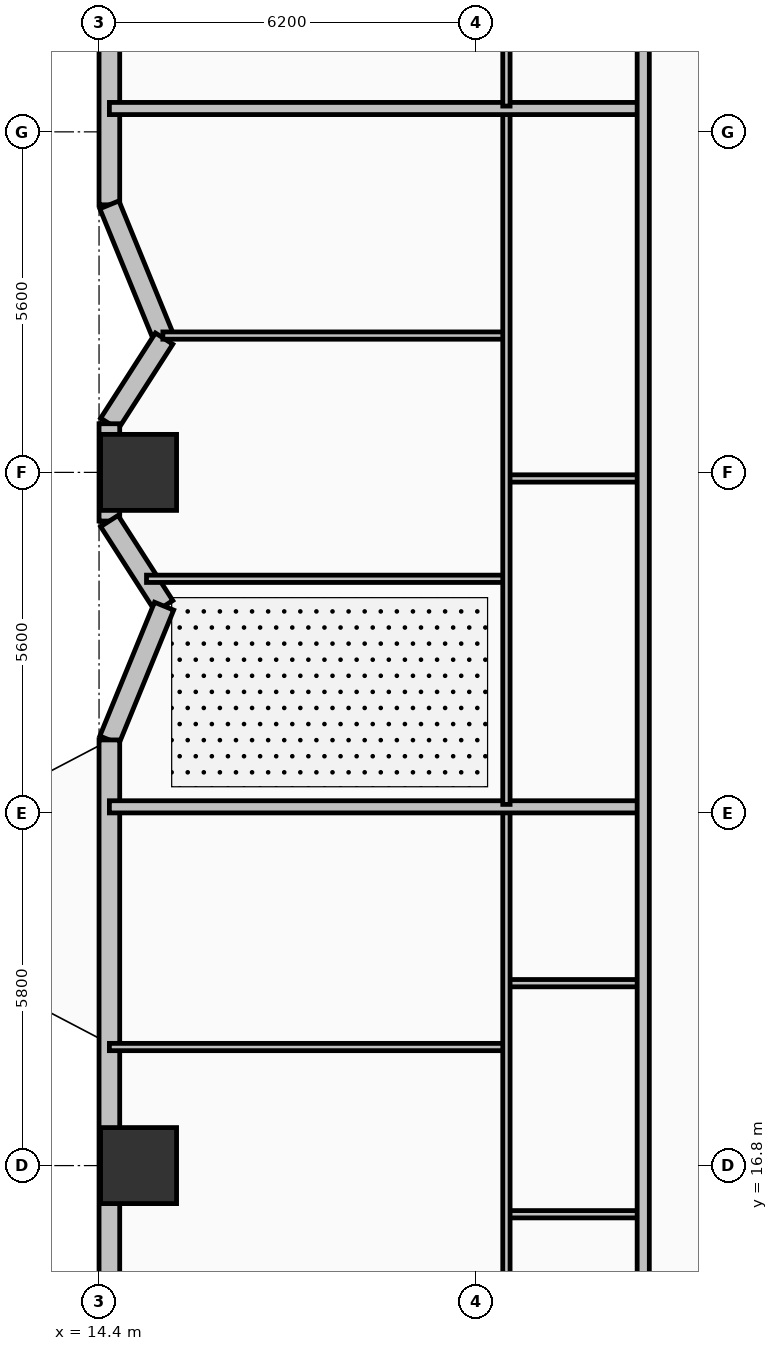
"""IFC4 building model, lengths in metres.
Left out: names, types, materials, properties, quantities, classifications, styles, units other than length and angle.
Written with IfcOpenShell. Run it as: python <this file> out.ifc"""

import sys

from ifc_helpers import new_model, si_unit, direction, frame, frame_2d, origin, origin_2d, place, context, subcontext, project, spatial, rectangle, extrude, element, fill, save


model = new_model("IFC4")
c1 = context("Model", 3, precision=1e-05, world=origin(), true_north=direction((0.0, 1.0)))
c2 = subcontext(c1, "Body", "Model", "MODEL_VIEW")
j1 = project(units=[si_unit("LENGTHUNIT", "METRE"), si_unit("PLANEANGLEUNIT", "RADIAN")], contexts=[c1])
p1 = place(None, origin())
s1 = spatial("IfcSite", under=j1, at=p1, CompositionType="ELEMENT")
p2 = place(p1, origin())
s2 = spatial("IfcBuilding", under=s1, at=p2, CompositionType="ELEMENT")
p3 = place(p2, frame((0.0, 0.0, 36.2)))
s3 = spatial("IfcBuildingStorey", under=s2, at=p3, CompositionType="ELEMENT", Elevation=36.2)
for number, where, z_axis, x_axis in (
    (1, (15.05, 16.8, 0.0), (0.0, 0.0, 1.0), (1.0, 0.0, 0.0)),
    (2, (15.05, 28.2, 0.0), (0.0, 0.0, 1.0), (1.0, 0.0, 0.0)),
):
    element("IfcColumn", number, at=place(p3, frame(where, z_axis=z_axis, x_axis=x_axis)), inside=s3, PredefinedType="COLUMN", context=c2, shape_type="SweptSolid", body=[
        extrude(rectangle(XDim=1.25, YDim=1.25, at=origin_2d()), origin(), (0.0, 0.0, 1.0), 3.7),
    ])
p4 = place(p3, frame((14.57, 47.4, 0.0), z_axis=(0.0, 0.0, 1.0), x_axis=(0.0, -1.0, 0.0)))
e3 = element("IfcWall", 3, at=p4, inside=s3, PredefinedType="SOLIDWALL", context=c2, shape_type="SweptSolid", body=[
    extrude(rectangle(XDim=14.8, YDim=0.34, at=frame_2d((7.4, 0.0))), origin(), (0.0, 0.0, 1.0), 2.7),
])
p5 = place(p4, frame((2.84, 0.0, 0.69)))
e4 = element("IfcOpeningElement", 4, at=p5, cuts=e3, PredefinedType="OPENING", context=c2, shape_type="SweptSolid", body=[
    extrude(rectangle(XDim=1.4, YDim=1.85, at=frame_2d((0.7, 0.925))), frame((0.0, 0.18, 0.0), z_axis=(0.0, -1.0, 0.0), x_axis=(1.0, 0.0, 0.0)), (0.0, 0.0, 1.0), 0.36),
])
p6 = place(p4, frame((5.72, 0.0, 0.69)))
e5 = element("IfcOpeningElement", 5, at=p6, cuts=e3, PredefinedType="OPENING", context=c2, shape_type="SweptSolid", body=[
    extrude(rectangle(XDim=1.4, YDim=1.85, at=frame_2d((0.7, 0.925))), frame((0.0, 0.18, 0.0), z_axis=(0.0, -1.0, 0.0), x_axis=(1.0, 0.0, 0.0)), (0.0, 0.0, 1.0), 0.36),
])
p7 = place(p4, frame((11.413, 0.0, 0.73)))
e6 = element("IfcOpeningElement", 6, at=p7, cuts=e3, PredefinedType="OPENING", context=c2, shape_type="SweptSolid", body=[
    extrude(rectangle(XDim=1.4, YDim=1.85, at=frame_2d((0.7, 0.925))), frame((0.0, 0.18, 0.0), z_axis=(0.0, -1.0, 0.0), x_axis=(1.0, 0.0, 0.0)), (0.0, 0.0, 1.0), 0.36),
])
p8 = place(p3, frame((14.57, 32.6, 0.0), z_axis=(0.0, 0.0, 1.0), x_axis=(0.378568858991, -0.925573130013, 0.0)))
e7 = element("IfcWall", 7, at=p8, inside=s3, PredefinedType="SOLIDWALL", context=c2, shape_type="SweptSolid", body=[
    extrude(rectangle(XDim=2.377, YDim=0.34, at=frame_2d((1.188, 0.0))), origin(), (0.0, 0.0, 1.0), 2.7),
])
p9 = place(p8, frame((0.638, 0.0, 0.89)))
e8 = element("IfcOpeningElement", 8, at=p9, cuts=e7, PredefinedType="OPENING", context=c2, shape_type="SweptSolid", body=[
    extrude(rectangle(XDim=1.1, YDim=1.65, at=frame_2d((0.55, 0.825))), frame((0.0, 0.18, 0.0), z_axis=(0.0, -1.0, 0.0), x_axis=(1.0, 0.0, 0.0)), (0.0, 0.0, 1.0), 0.36),
])
p10 = place(p3, frame((15.47, 30.4, 0.0), z_axis=(0.0, 0.0, 1.0), x_axis=(-0.540742762169, -0.841188008214, 0.0)))
e9 = element("IfcWall", 9, at=p10, inside=s3, PredefinedType="SOLIDWALL", context=c2, shape_type="SweptSolid", body=[
    extrude(rectangle(XDim=1.664, YDim=0.34, at=frame_2d((0.832, 0.0))), origin(), (0.0, 0.0, 1.0), 2.7),
])
p11 = place(p10, frame((0.16, 0.0, 0.89)))
e10 = element("IfcOpeningElement", 10, at=p11, cuts=e9, PredefinedType="OPENING", context=c2, shape_type="SweptSolid", body=[
    extrude(rectangle(XDim=1.1, YDim=1.65, at=frame_2d((0.55, 0.825))), frame((0.0, 0.18, 0.0), z_axis=(0.0, -1.0, 0.0), x_axis=(1.0, 0.0, 0.0)), (0.0, 0.0, 1.0), 0.36),
])
p12 = place(p3, frame((14.57, 29.0, 0.0), z_axis=(0.0, 0.0, 1.0), x_axis=(0.0, -1.0, 0.0)))
e11 = element("IfcWall", 11, at=p12, inside=s3, PredefinedType="SOLIDWALL", context=c2, shape_type="SweptSolid", body=[
    extrude(rectangle(XDim=1.6, YDim=0.34, at=frame_2d((0.8, 0.0))), origin(), (0.0, 0.0, 1.0), 2.7),
])
p13 = place(p3, frame((14.57, 27.4, 0.0), z_axis=(0.0, 0.0, 1.0), x_axis=(0.540742762169, -0.841188008214, 0.0)))
e12 = element("IfcWall", 12, at=p13, inside=s3, PredefinedType="SOLIDWALL", context=c2, shape_type="SweptSolid", body=[
    extrude(rectangle(XDim=1.664, YDim=0.34, at=frame_2d((0.832, 0.0))), origin(), (0.0, 0.0, 1.0), 2.7),
])
p14 = place(p3, frame((15.47, 26.0, 0.0), z_axis=(0.0, 0.0, 1.0), x_axis=(-0.378604849088, -0.925558408879, 0.0)))
e13 = element("IfcWall", 13, at=p14, inside=s3, PredefinedType="SOLIDWALL", context=c2, shape_type="SweptSolid", body=[
    extrude(rectangle(XDim=2.377, YDim=0.34, at=frame_2d((1.188, 0.0))), origin(), (0.0, 0.0, 1.0), 2.7),
])
p15 = place(p14, frame((0.638, 0.0, 0.89)))
e14 = element("IfcOpeningElement", 14, at=p15, cuts=e13, PredefinedType="OPENING", context=c2, shape_type="SweptSolid", body=[
    extrude(rectangle(XDim=1.1, YDim=1.65, at=frame_2d((0.55, 0.825))), frame((0.0, 0.18, 0.0), z_axis=(0.0, -1.0, 0.0), x_axis=(1.0, 0.0, 0.0)), (0.0, 0.0, 1.0), 0.36),
])
p16 = place(p3, frame((14.57, 23.8, 0.0), z_axis=(0.0, 0.0, 1.0), x_axis=(0.0, -1.0, 0.0)))
e15 = element("IfcWall", 15, at=p16, inside=s3, PredefinedType="SOLIDWALL", context=c2, shape_type="SweptSolid", body=[
    extrude(rectangle(XDim=14.8, YDim=0.34, at=frame_2d((7.4, 0.0))), origin(), (0.0, 0.0, 1.0), 2.7),
])
p17 = place(p16, frame((1.7, 0.0, 0.0)))
e16 = element("IfcOpeningElement", 16, at=p17, cuts=e15, PredefinedType="OPENING", context=c2, shape_type="SweptSolid", body=[
    extrude(rectangle(XDim=1.6, YDim=2.1, at=frame_2d((0.8, 1.05))), frame((0.0, 0.18, 0.0), z_axis=(0.0, -1.0, 0.0), x_axis=(1.0, 0.0, 0.0)), (0.0, 0.0, 1.0), 0.36),
])
p18 = place(p16, frame((7.68, 0.0, 0.89)))
e17 = element("IfcOpeningElement", 17, at=p18, cuts=e15, PredefinedType="OPENING", context=c2, shape_type="SweptSolid", body=[
    extrude(rectangle(XDim=1.1, YDim=1.65, at=frame_2d((0.55, 0.825))), frame((0.0, 0.18, 0.0), z_axis=(0.0, -1.0, 0.0), x_axis=(1.0, 0.0, 0.0)), (0.0, 0.0, 1.0), 0.36),
])
p19 = place(p16, frame((9.9, 0.0, 0.93)))
e18 = element("IfcOpeningElement", 18, at=p19, cuts=e15, PredefinedType="OPENING", context=c2, shape_type="SweptSolid", body=[
    extrude(rectangle(XDim=1.1, YDim=1.65, at=frame_2d((0.55, 0.825))), frame((0.0, 0.18, 0.0), z_axis=(0.0, -1.0, 0.0), x_axis=(1.0, 0.0, 0.0)), (0.0, 0.0, 1.0), 0.36),
])
p20 = place(p3, frame((21.1, 16.0, 0.0), z_axis=(0.0, 0.0, 1.0), x_axis=(1.0, 0.0, 0.0)))
e19 = element("IfcWall", 19, at=p20, inside=s3, PredefinedType="PARTITIONING", context=c2, shape_type="SweptSolid", body=[
    extrude(rectangle(XDim=2.25, YDim=0.12, at=frame_2d((1.125, 0.0))), origin(), (0.0, 0.0, 1.0), 2.53),
])
p21 = place(p20, frame((0.6, 0.0, 0.0)))
e20 = element("IfcOpeningElement", 20, at=p21, cuts=e19, PredefinedType="OPENING", context=c2, shape_type="SweptSolid", body=[
    extrude(rectangle(XDim=0.85, YDim=2.1, at=frame_2d((0.425, 1.05))), frame((0.0, 0.07, 0.0), z_axis=(0.0, -1.0, 0.0), x_axis=(1.0, 0.0, 0.0)), (0.0, 0.0, 1.0), 0.14),
])
p22 = place(p3, frame((21.1, 19.8, 0.0), z_axis=(0.0, 0.0, 1.0), x_axis=(1.0, 0.0, 0.0)))
e21 = element("IfcWall", 21, at=p22, inside=s3, PredefinedType="PARTITIONING", context=c2, shape_type="SweptSolid", body=[
    extrude(rectangle(XDim=2.25, YDim=0.12, at=frame_2d((1.125, 0.0))), origin(), (0.0, 0.0, 1.0), 2.53),
])
p23 = place(p3, frame((14.57, 18.75, 0.0), z_axis=(0.0, 0.0, 1.0), x_axis=(1.0, 0.0, 0.0)))
e22 = element("IfcWall", 22, at=p23, inside=s3, PredefinedType="PARTITIONING", context=c2, shape_type="SweptSolid", body=[
    extrude(rectangle(XDim=6.53, YDim=0.12, at=frame_2d((3.265, 0.0))), origin(), (0.0, 0.0, 1.0), 2.53),
])
p24 = place(p23, frame((5.18, 0.0, 0.0)))
e23 = element("IfcOpeningElement", 23, at=p24, cuts=e22, PredefinedType="OPENING", context=c2, shape_type="SweptSolid", body=[
    extrude(rectangle(XDim=0.9, YDim=2.1, at=frame_2d((0.45, 1.05))), frame((0.0, 0.07, 0.0), z_axis=(0.0, -1.0, 0.0), x_axis=(1.0, 0.0, 0.0)), (0.0, 0.0, 1.0), 0.14),
])
p25 = place(p3, frame((21.1, 10.64, 0.0), z_axis=(0.0, 0.0, 1.0), x_axis=(0.0, 1.0, 0.0)))
e24 = element("IfcWall", 24, at=p25, inside=s3, PredefinedType="PARTITIONING", context=c2, shape_type="SweptSolid", body=[
    extrude(rectangle(XDim=12.02, YDim=0.12, at=frame_2d((6.01, 0.0))), origin(), (0.0, 0.0, 1.0), 2.53),
])
p26 = place(p25, frame((0.41, 0.0, 0.0)))
e25 = element("IfcOpeningElement", 25, at=p26, cuts=e24, PredefinedType="OPENING", context=c2, shape_type="SweptSolid", body=[
    extrude(rectangle(XDim=0.9, YDim=2.1, at=frame_2d((0.45, 1.05))), frame((0.0, 0.07, 0.0), z_axis=(0.0, -1.0, 0.0), x_axis=(1.0, 0.0, 0.0)), (0.0, 0.0, 1.0), 0.14),
])
p27 = place(p25, frame((10.185, 0.0, 0.0)))
e26 = element("IfcOpeningElement", 26, at=p27, cuts=e24, PredefinedType="OPENING", context=c2, shape_type="SweptSolid", body=[
    extrude(rectangle(XDim=0.82, YDim=2.08, at=frame_2d((0.41, 1.04))), frame((0.0, 0.07, 0.0), z_axis=(0.0, -1.0, 0.0), x_axis=(1.0, 0.0, 0.0)), (0.0, 0.0, 1.0), 0.14),
])
p28 = place(p3, frame((14.57, 22.7, 0.0), z_axis=(0.0, 0.0, 1.0), x_axis=(1.0, 0.0, 0.0)))
e27 = element("IfcWall", 27, at=p28, inside=s3, PredefinedType="PARTITIONING", context=c2, shape_type="SweptSolid", body=[
    extrude(rectangle(XDim=8.78, YDim=0.2, at=frame_2d((4.39, 0.0))), origin(), (0.0, 0.0, 1.0), 2.53),
])
p29 = place(p3, frame((21.1, 28.1, 0.0), z_axis=(0.0, 0.0, 1.0), x_axis=(1.0, 0.0, 0.0)))
e28 = element("IfcWall", 28, at=p29, inside=s3, PredefinedType="PARTITIONING", context=c2, shape_type="SweptSolid", body=[
    extrude(rectangle(XDim=2.25, YDim=0.12, at=frame_2d((1.125, 0.0))), origin(), (0.0, 0.0, 1.0), 2.53),
])
p30 = place(p29, frame((0.6, 0.0, 0.0)))
e29 = element("IfcOpeningElement", 29, at=p30, cuts=e28, PredefinedType="OPENING", context=c2, shape_type="SweptSolid", body=[
    extrude(rectangle(XDim=0.85, YDim=2.1, at=frame_2d((0.425, 1.05))), frame((0.0, 0.07, 0.0), z_axis=(0.0, -1.0, 0.0), x_axis=(1.0, 0.0, 0.0)), (0.0, 0.0, 1.0), 0.14),
])
p31 = place(p3, frame((15.181, 26.45, 0.0), z_axis=(0.0, 0.0, 1.0), x_axis=(1.0, 0.0, 0.0)))
e30 = element("IfcWall", 30, at=p31, inside=s3, PredefinedType="PARTITIONING", context=c2, shape_type="SweptSolid", body=[
    extrude(rectangle(XDim=5.919, YDim=0.12, at=frame_2d((2.96, 0.0))), origin(), (0.0, 0.0, 1.0), 2.53),
])
p32 = place(p31, frame((4.569, 0.0, 0.0)))
e31 = element("IfcOpeningElement", 31, at=p32, cuts=e30, PredefinedType="OPENING", context=c2, shape_type="SweptSolid", body=[
    extrude(rectangle(XDim=0.9, YDim=2.1, at=frame_2d((0.45, 1.05))), frame((0.0, 0.07, 0.0), z_axis=(0.0, -1.0, 0.0), x_axis=(1.0, 0.0, 0.0)), (0.0, 0.0, 1.0), 0.14),
])
p33 = place(p3, frame((15.449, 30.45, 0.0), z_axis=(0.0, 0.0, 1.0), x_axis=(1.0, 0.0, 0.0)))
e32 = element("IfcWall", 32, at=p33, inside=s3, PredefinedType="PARTITIONING", context=c2, shape_type="SweptSolid", body=[
    extrude(rectangle(XDim=5.651, YDim=0.12, at=frame_2d((2.825, 0.0))), origin(), (0.0, 0.0, 1.0), 2.53),
])
p34 = place(p33, frame((4.301, 0.0, 0.0)))
e33 = element("IfcOpeningElement", 33, at=p34, cuts=e32, PredefinedType="OPENING", context=c2, shape_type="SweptSolid", body=[
    extrude(rectangle(XDim=0.9, YDim=2.1, at=frame_2d((0.45, 1.05))), frame((0.0, 0.07, 0.0), z_axis=(0.0, -1.0, 0.0), x_axis=(1.0, 0.0, 0.0)), (0.0, 0.0, 1.0), 0.14),
])
p35 = place(p3, frame((21.1, 22.74, 0.0), z_axis=(0.0, 0.0, 1.0), x_axis=(0.0, 1.0, 0.0)))
e34 = element("IfcWall", 34, at=p35, inside=s3, PredefinedType="PARTITIONING", context=c2, shape_type="SweptSolid", body=[
    extrude(rectangle(XDim=11.404, YDim=0.12, at=frame_2d((5.702, 0.0))), origin(), (0.0, 0.0, 1.0), 2.53),
])
p36 = place(p35, frame((0.41, 0.0, 0.0)))
e35 = element("IfcOpeningElement", 35, at=p36, cuts=e34, PredefinedType="OPENING", context=c2, shape_type="SweptSolid", body=[
    extrude(rectangle(XDim=0.9, YDim=2.1, at=frame_2d((0.45, 1.05))), frame((0.0, 0.07, 0.0), z_axis=(0.0, -1.0, 0.0), x_axis=(1.0, 0.0, 0.0)), (0.0, 0.0, 1.0), 0.14),
])
p37 = place(p3, frame((14.57, 34.184, 0.0), z_axis=(0.0, 0.0, 1.0), x_axis=(1.0, 0.0, 0.0)))
e36 = element("IfcWall", 36, at=p37, inside=s3, PredefinedType="PARTITIONING", context=c2, shape_type="SweptSolid", body=[
    extrude(rectangle(XDim=8.78, YDim=0.2, at=frame_2d((4.39, 0.0))), origin(), (0.0, 0.0, 1.0), 2.53),
])
p38 = place(p3, frame((21.1, 34.224, 0.0), z_axis=(0.0, 0.0, 1.0), x_axis=(0.0, 1.0, 0.0)))
e37 = element("IfcWall", 37, at=p38, inside=s3, PredefinedType="PARTITIONING", context=c2, shape_type="SweptSolid", body=[
    extrude(rectangle(XDim=11.536, YDim=0.12, at=frame_2d((5.768, 0.0))), origin(), (0.0, 0.0, 1.0), 2.53),
])
p39 = place(p38, frame((0.41, 0.0, 0.0)))
e38 = element("IfcOpeningElement", 38, at=p39, cuts=e37, PredefinedType="OPENING", context=c2, shape_type="SweptSolid", body=[
    extrude(rectangle(XDim=0.9, YDim=2.1, at=frame_2d((0.45, 1.05))), frame((0.0, 0.07, 0.0), z_axis=(0.0, -1.0, 0.0), x_axis=(1.0, 0.0, 0.0)), (0.0, 0.0, 1.0), 0.14),
])
p40 = place(p3, frame((23.35, 10.6, 0.0), z_axis=(0.0, 0.0, 1.0), x_axis=(0.0, 1.0, 0.0)))
e39 = element("IfcWall", 39, at=p40, inside=s3, PredefinedType="PARTITIONING", context=c2, shape_type="SweptSolid", body=[
    extrude(rectangle(XDim=35.2, YDim=0.2, at=frame_2d((17.6, 0.0))), origin(), (0.0, 0.0, 1.0), 2.53),
])
p41 = place(p40, frame((2.65, 0.0, 0.0)))
e40 = element("IfcOpeningElement", 40, at=p41, cuts=e39, PredefinedType="OPENING", context=c2, shape_type="SweptSolid", body=[
    extrude(rectangle(XDim=1.0, YDim=2.15, at=frame_2d((0.5, 1.075))), frame((0.0, 0.11, 0.0), z_axis=(0.0, -1.0, 0.0), x_axis=(1.0, 0.0, 0.0)), (0.0, 0.0, 1.0), 0.22),
])
p42 = place(p40, frame((12.65, 0.0, 0.0)))
e41 = element("IfcOpeningElement", 41, at=p42, cuts=e39, PredefinedType="OPENING", context=c2, shape_type="SweptSolid", body=[
    extrude(rectangle(XDim=1.0, YDim=2.15, at=frame_2d((0.5, 1.075))), frame((0.0, 0.11, 0.0), z_axis=(0.0, -1.0, 0.0), x_axis=(1.0, 0.0, 0.0)), (0.0, 0.0, 1.0), 0.22),
])
p43 = place(p40, frame((24.134, 0.0, 0.0)))
e42 = element("IfcOpeningElement", 42, at=p43, cuts=e39, PredefinedType="OPENING", context=c2, shape_type="SweptSolid", body=[
    extrude(rectangle(XDim=1.0, YDim=2.15, at=frame_2d((0.5, 1.075))), frame((0.0, 0.11, 0.0), z_axis=(0.0, -1.0, 0.0), x_axis=(1.0, 0.0, 0.0)), (0.0, 0.0, 1.0), 0.22),
])
p44 = place(p7, origin())
e43 = element("IfcWindow", 43, at=p44, inside=s3, PartitioningType="SINGLE_PANEL", PredefinedType="WINDOW", context=c2, shape_type="SweptSolid", body=[
    extrude(rectangle(XDim=1.4, YDim=1.85, at=frame_2d((0.7, 0.925))), frame((0.0, 0.03, 0.0), z_axis=(0.0, -1.0, 0.0), x_axis=(1.0, 0.0, 0.0)), (0.0, 0.0, 1.0), 0.06),
])
fill(e6, e43)
p45 = place(p9, origin())
e44 = element("IfcWindow", 44, at=p45, inside=s3, PartitioningType="SINGLE_PANEL", PredefinedType="WINDOW", context=c2, shape_type="SweptSolid", body=[
    extrude(rectangle(XDim=1.1, YDim=1.65, at=frame_2d((0.55, 0.825))), frame((0.0, 0.03, 0.0), z_axis=(0.0, -1.0, 0.0), x_axis=(1.0, 0.0, 0.0)), (0.0, 0.0, 1.0), 0.06),
])
fill(e8, e44)
p46 = place(p11, origin())
e45 = element("IfcWindow", 45, at=p46, inside=s3, PartitioningType="SINGLE_PANEL", PredefinedType="WINDOW", context=c2, shape_type="SweptSolid", body=[
    extrude(rectangle(XDim=1.1, YDim=1.65, at=frame_2d((0.55, 0.825))), frame((0.0, 0.03, 0.0), z_axis=(0.0, -1.0, 0.0), x_axis=(1.0, 0.0, 0.0)), (0.0, 0.0, 1.0), 0.06),
])
fill(e10, e45)
p47 = place(p15, origin())
e46 = element("IfcWindow", 46, at=p47, inside=s3, PartitioningType="SINGLE_PANEL", PredefinedType="WINDOW", context=c2, shape_type="SweptSolid", body=[
    extrude(rectangle(XDim=1.1, YDim=1.65, at=frame_2d((0.55, 0.825))), frame((0.0, 0.03, 0.0), z_axis=(0.0, -1.0, 0.0), x_axis=(1.0, 0.0, 0.0)), (0.0, 0.0, 1.0), 0.06),
])
fill(e14, e46)
p48 = place(p17, origin())
e47 = element("IfcDoor", 47, at=p48, inside=s3, OperationType="DOUBLE_DOOR_SINGLE_SWING", PredefinedType="DOOR", context=c2, shape_type="SweptSolid", body=[
    extrude(rectangle(XDim=1.6, YDim=2.1, at=frame_2d((0.8, 1.05))), frame((0.0, 0.025, 0.0), z_axis=(0.0, -1.0, 0.0), x_axis=(1.0, 0.0, 0.0)), (0.0, 0.0, 1.0), 0.05),
])
fill(e16, e47)
p49 = place(p18, origin())
e48 = element("IfcWindow", 48, at=p49, inside=s3, PartitioningType="SINGLE_PANEL", PredefinedType="WINDOW", context=c2, shape_type="SweptSolid", body=[
    extrude(rectangle(XDim=1.1, YDim=1.65, at=frame_2d((0.55, 0.825))), frame((0.0, 0.03, 0.0), z_axis=(0.0, -1.0, 0.0), x_axis=(1.0, 0.0, 0.0)), (0.0, 0.0, 1.0), 0.06),
])
fill(e17, e48)
p50 = place(p21, origin())
e49 = element("IfcDoor", 49, at=p50, inside=s3, OperationType="SINGLE_SWING_LEFT", PredefinedType="DOOR", context=c2, shape_type="SweptSolid", body=[
    extrude(rectangle(XDim=0.85, YDim=2.1, at=frame_2d((0.425, 1.05))), frame((0.0, 0.025, 0.0), z_axis=(0.0, -1.0, 0.0), x_axis=(1.0, 0.0, 0.0)), (0.0, 0.0, 1.0), 0.05),
])
fill(e20, e49)
p51 = place(p24, origin())
e50 = element("IfcDoor", 50, at=p51, inside=s3, OperationType="SINGLE_SWING_RIGHT", PredefinedType="DOOR", context=c2, shape_type="SweptSolid", body=[
    extrude(rectangle(XDim=0.9, YDim=2.1, at=frame_2d((0.45, 1.05))), frame((0.0, 0.025, 0.0), z_axis=(0.0, -1.0, 0.0), x_axis=(1.0, 0.0, 0.0)), (0.0, 0.0, 1.0), 0.05),
])
fill(e23, e50)
p52 = place(p27, origin())
e51 = element("IfcDoor", 51, at=p52, inside=s3, OperationType="SINGLE_SWING_LEFT", PredefinedType="DOOR", context=c2, shape_type="SweptSolid", body=[
    extrude(rectangle(XDim=0.82, YDim=2.08, at=frame_2d((0.41, 1.04))), frame((0.0, 0.025, 0.0), z_axis=(0.0, -1.0, 0.0), x_axis=(1.0, 0.0, 0.0)), (0.0, 0.0, 1.0), 0.05),
])
fill(e26, e51)
p53 = place(p30, origin())
e52 = element("IfcDoor", 52, at=p53, inside=s3, OperationType="SINGLE_SWING_RIGHT", PredefinedType="DOOR", context=c2, shape_type="SweptSolid", body=[
    extrude(rectangle(XDim=0.85, YDim=2.1, at=frame_2d((0.425, 1.05))), frame((0.0, 0.025, 0.0), z_axis=(0.0, -1.0, 0.0), x_axis=(1.0, 0.0, 0.0)), (0.0, 0.0, 1.0), 0.05),
])
fill(e29, e52)
p54 = place(p32, origin())
e53 = element("IfcDoor", 53, at=p54, inside=s3, OperationType="SINGLE_SWING_RIGHT", PredefinedType="DOOR", context=c2, shape_type="SweptSolid", body=[
    extrude(rectangle(XDim=0.9, YDim=2.1, at=frame_2d((0.45, 1.05))), frame((0.0, 0.025, 0.0), z_axis=(0.0, -1.0, 0.0), x_axis=(1.0, 0.0, 0.0)), (0.0, 0.0, 1.0), 0.05),
])
fill(e31, e53)
p55 = place(p34, origin())
e54 = element("IfcDoor", 54, at=p55, inside=s3, OperationType="SINGLE_SWING_LEFT", PredefinedType="DOOR", context=c2, shape_type="SweptSolid", body=[
    extrude(rectangle(XDim=0.9, YDim=2.1, at=frame_2d((0.45, 1.05))), frame((0.0, 0.025, 0.0), z_axis=(0.0, -1.0, 0.0), x_axis=(1.0, 0.0, 0.0)), (0.0, 0.0, 1.0), 0.05),
])
fill(e33, e54)
p56 = place(p36, origin())
e55 = element("IfcDoor", 55, at=p56, inside=s3, OperationType="SINGLE_SWING_LEFT", PredefinedType="DOOR", context=c2, shape_type="SweptSolid", body=[
    extrude(rectangle(XDim=0.9, YDim=2.1, at=frame_2d((0.45, 1.05))), frame((0.0, 0.025, 0.0), z_axis=(0.0, -1.0, 0.0), x_axis=(1.0, 0.0, 0.0)), (0.0, 0.0, 1.0), 0.05),
])
fill(e35, e55)
p57 = place(p39, origin())
e56 = element("IfcDoor", 56, at=p57, inside=s3, OperationType="SINGLE_SWING_RIGHT", PredefinedType="DOOR", context=c2, shape_type="SweptSolid", body=[
    extrude(rectangle(XDim=0.9, YDim=2.1, at=frame_2d((0.45, 1.05))), frame((0.0, 0.025, 0.0), z_axis=(0.0, -1.0, 0.0), x_axis=(1.0, 0.0, 0.0)), (0.0, 0.0, 1.0), 0.05),
])
fill(e38, e56)
p58 = place(p42, origin())
e57 = element("IfcDoor", 57, at=p58, inside=s3, OperationType="SINGLE_SWING_RIGHT", PredefinedType="DOOR", context=c2, shape_type="SweptSolid", body=[
    extrude(rectangle(XDim=1.0, YDim=2.15, at=frame_2d((0.5, 1.075))), frame((0.0, 0.025, 0.0), z_axis=(0.0, -1.0, 0.0), x_axis=(1.0, 0.0, 0.0)), (0.0, 0.0, 1.0), 0.05),
])
fill(e41, e57)
p59 = place(p43, origin())
e58 = element("IfcDoor", 58, at=p59, inside=s3, OperationType="SINGLE_SWING_LEFT", PredefinedType="DOOR", context=c2, shape_type="SweptSolid", body=[
    extrude(rectangle(XDim=1.0, YDim=2.15, at=frame_2d((0.5, 1.075))), frame((0.0, 0.025, 0.0), z_axis=(0.0, -1.0, 0.0), x_axis=(1.0, 0.0, 0.0)), (0.0, 0.0, 1.0), 0.05),
])
fill(e42, e58)
save(model, sys.argv[1])
